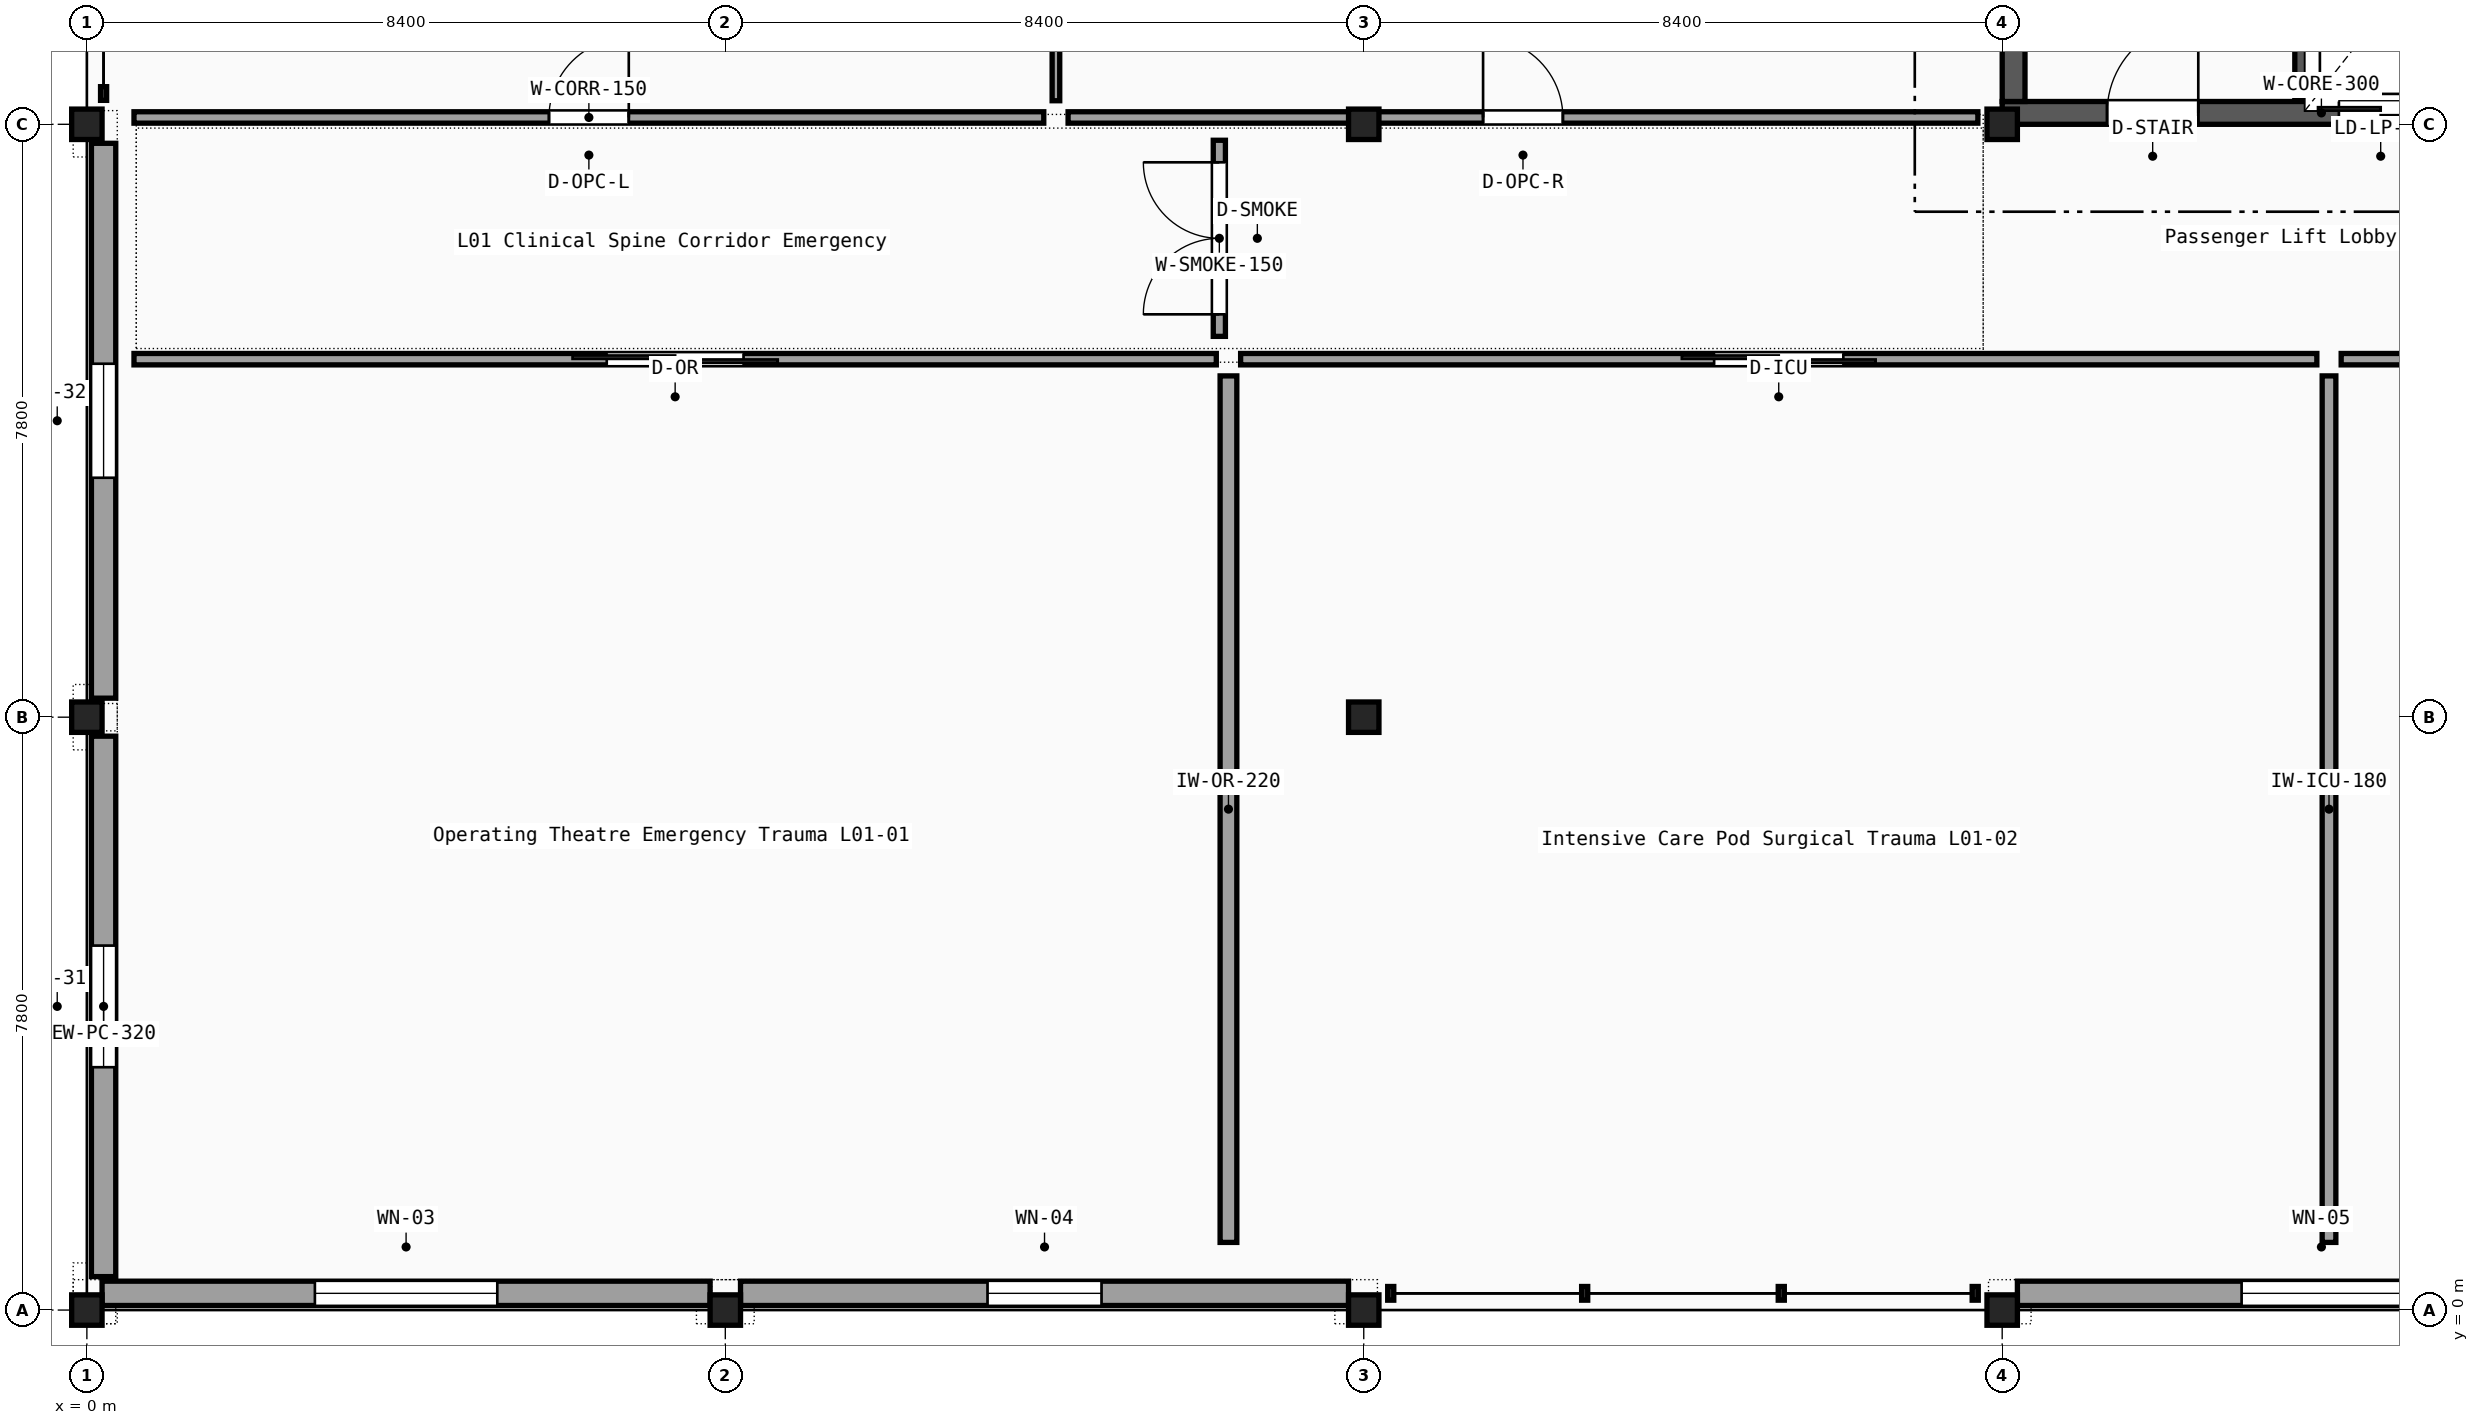
"""IFC4 building model, lengths in metres.
Left out: names, types, materials, properties, quantities, classifications, styles, units other than length and angle.
Written with IfcOpenShell. Run it as: python <this file> out.ifc"""

import sys

from ifc_helpers import new_model, si_unit, direction, frame, frame_2d, origin, origin_2d, place, context, subcontext, project, spatial, rectangle, i_section, extrude, element, fill, save


model = new_model("IFC4")
c1 = context("Model", 3, precision=1e-05, world=origin(), true_north=direction((0.0, 1.0)))
c2 = subcontext(c1, "Body", "Model", "MODEL_VIEW")
j1 = project(units=[si_unit("LENGTHUNIT", "METRE"), si_unit("PLANEANGLEUNIT", "RADIAN")], contexts=[c1])
p1 = place(None, origin())
s1 = spatial("IfcSite", under=j1, at=p1, CompositionType="ELEMENT")
p2 = place(p1, origin())
s2 = spatial("IfcBuilding", under=s1, at=p2, CompositionType="ELEMENT")
p3 = place(p2, frame((0.0, 0.0, 5.1)))
s3 = spatial("IfcBuildingStorey", under=s2, at=p3, CompositionType="ELEMENT", Elevation=5.1)
for number, where, z_axis, x_axis in (
    (1, (0.0, 0.0, 0.0), (0.0, 0.0, 1.0), (1.0, 0.0, 0.0)),
    (2, (0.0, 7.8, 0.0), (0.0, 0.0, 1.0), (1.0, 0.0, 0.0)),
    (3, (0.0, 15.6, 0.0), (0.0, 0.0, 1.0), (1.0, 0.0, 0.0)),
    (4, (8.4, 0.0, 0.0), (0.0, 0.0, 1.0), (1.0, 0.0, 0.0)),
    (5, (16.8, 0.0, 0.0), (0.0, 0.0, 1.0), (1.0, 0.0, 0.0)),
    (6, (16.8, 7.8, 0.0), (0.0, 0.0, 1.0), (1.0, 0.0, 0.0)),
    (7, (16.8, 15.6, 0.0), (0.0, 0.0, 1.0), (1.0, 0.0, 0.0)),
    (8, (25.2, 0.0, 0.0), (0.0, 0.0, 1.0), (1.0, 0.0, 0.0)),
    (9, (25.2, 15.6, 0.0), (0.0, 0.0, 1.0), (1.0, 0.0, 0.0)),
):
    element("IfcColumn", number, at=place(p3, frame(where, z_axis=z_axis, x_axis=x_axis)), inside=s3, PredefinedType="COLUMN", context=c2, shape_type="SweptSolid", body=[
        extrude(i_section(OverallWidth=0.3, OverallDepth=0.4, WebThickness=0.013, FlangeThickness=0.024, FilletRadius=0.027, at=origin_2d()), origin(), (0.0, 0.0, 1.0), 5.1),
    ])
p4 = place(p3, frame((0.22, 0.44, 0.0), z_axis=(0.0, 0.0, 1.0), x_axis=(0.0, 1.0, 0.0)))
e10 = element("IfcWall", 10, at=p4, inside=s3, PredefinedType="SOLIDWALL", context=c2, shape_type="SweptSolid", body=[
    extrude(rectangle(XDim=7.11, YDim=0.32, at=frame_2d((3.555, 0.0))), origin(), (0.0, 0.0, 1.0), 4.23),
])
p5 = place(p4, frame((2.755, 0.0, 0.95)))
e11 = element("IfcOpeningElement", 11, at=p5, cuts=e10, PredefinedType="OPENING", context=c2, shape_type="SweptSolid", body=[
    extrude(rectangle(XDim=1.6, YDim=1.55, at=frame_2d((0.8, 0.775))), frame((0.0, 0.17, 0.0), z_axis=(0.0, -1.0, 0.0), x_axis=(1.0, 0.0, 0.0)), (0.0, 0.0, 1.0), 0.34),
])
p6 = place(p3, frame((0.22, 8.05, 0.0), z_axis=(0.0, 0.0, 1.0), x_axis=(0.0, 1.0, 0.0)))
e12 = element("IfcWall", 12, at=p6, inside=s3, PredefinedType="SOLIDWALL", context=c2, shape_type="SweptSolid", body=[
    extrude(rectangle(XDim=7.3, YDim=0.32, at=frame_2d((3.65, 0.0))), origin(), (0.0, 0.0, 1.0), 4.23),
])
p7 = place(p6, frame((2.9, 0.0, 0.8)))
e13 = element("IfcOpeningElement", 13, at=p7, cuts=e12, PredefinedType="OPENING", context=c2, shape_type="SweptSolid", body=[
    extrude(rectangle(XDim=1.5, YDim=1.75, at=frame_2d((0.75, 0.875))), frame((0.0, 0.17, 0.0), z_axis=(0.0, -1.0, 0.0), x_axis=(1.0, 0.0, 0.0)), (0.0, 0.0, 1.0), 0.34),
])
p8 = place(p3, frame((0.2, 0.22, 0.0), z_axis=(0.0, 0.0, 1.0), x_axis=(1.0, 0.0, 0.0)))
e14 = element("IfcWall", 14, at=p8, inside=s3, PredefinedType="SOLIDWALL", context=c2, shape_type="SweptSolid", body=[
    extrude(rectangle(XDim=8.0, YDim=0.32, at=frame_2d((4.0, 0.0))), origin(), (0.0, 0.0, 1.0), 4.44),
])
p9 = place(p8, frame((2.8, 0.0, 0.9)))
e15 = element("IfcOpeningElement", 15, at=p9, cuts=e14, PredefinedType="OPENING", context=c2, shape_type="SweptSolid", body=[
    extrude(rectangle(XDim=2.4, YDim=1.6, at=frame_2d((1.2, 0.8))), frame((0.0, 0.17, 0.0), z_axis=(0.0, -1.0, 0.0), x_axis=(1.0, 0.0, 0.0)), (0.0, 0.0, 1.0), 0.34),
])
p10 = place(p3, frame((8.6, 0.22, 0.0), z_axis=(0.0, 0.0, 1.0), x_axis=(1.0, 0.0, 0.0)))
e16 = element("IfcWall", 16, at=p10, inside=s3, PredefinedType="SOLIDWALL", context=c2, shape_type="SweptSolid", body=[
    extrude(rectangle(XDim=8.0, YDim=0.32, at=frame_2d((4.0, 0.0))), origin(), (0.0, 0.0, 1.0), 4.43),
])
p11 = place(p10, frame((3.25, 0.0, 0.95)))
e17 = element("IfcOpeningElement", 17, at=p11, cuts=e16, PredefinedType="OPENING", context=c2, shape_type="SweptSolid", body=[
    extrude(rectangle(XDim=1.5, YDim=1.5, at=frame_2d((0.75, 0.75))), frame((0.0, 0.17, 0.0), z_axis=(0.0, -1.0, 0.0), x_axis=(1.0, 0.0, 0.0)), (0.0, 0.0, 1.0), 0.34),
])
p12 = place(p3, frame((25.4, 0.22, 0.0), z_axis=(0.0, 0.0, 1.0), x_axis=(1.0, 0.0, 0.0)))
e18 = element("IfcWall", 18, at=p12, inside=s3, PredefinedType="SOLIDWALL", context=c2, shape_type="SweptSolid", body=[
    extrude(rectangle(XDim=8.0, YDim=0.32, at=frame_2d((4.0, 0.0))), origin(), (0.0, 0.0, 1.0), 4.43),
])
p13 = place(p12, frame((2.95, 0.0, 0.95)))
e19 = element("IfcOpeningElement", 19, at=p13, cuts=e18, PredefinedType="OPENING", context=c2, shape_type="SweptSolid", body=[
    extrude(rectangle(XDim=2.1, YDim=1.5, at=frame_2d((1.05, 0.75))), frame((0.0, 0.17, 0.0), z_axis=(0.0, -1.0, 0.0), x_axis=(1.0, 0.0, 0.0)), (0.0, 0.0, 1.0), 0.34),
])
p14 = place(p3, frame((25.2, 15.75, 0.0), z_axis=(0.0, 0.0, 1.0), x_axis=(1.0, 0.0, 0.0)))
e20 = element("IfcWall", 20, at=p14, inside=s3, PredefinedType="SHEAR", context=c2, shape_type="SweptSolid", body=[
    extrude(rectangle(XDim=8.4, YDim=0.3, at=frame_2d((4.2, 0.0))), origin(), (0.0, 0.0, 1.0), 4.85),
])
p15 = place(p14, frame((1.38, 0.0, 0.0)))
e21 = element("IfcOpeningElement", 21, at=p15, cuts=e20, PredefinedType="OPENING", context=c2, shape_type="SweptSolid", body=[
    extrude(rectangle(XDim=1.2, YDim=2.15, at=frame_2d((0.6, 1.075))), frame((0.0, 0.16, 0.0), z_axis=(0.0, -1.0, 0.0), x_axis=(1.0, 0.0, 0.0)), (0.0, 0.0, 1.0), 0.32),
])
p16 = place(p14, frame((4.43, 0.0, 0.0)))
e22 = element("IfcOpeningElement", 22, at=p16, cuts=e20, PredefinedType="OPENING", context=c2, shape_type="SweptSolid", body=[
    extrude(rectangle(XDim=1.1, YDim=2.15, at=frame_2d((0.55, 1.075))), frame((0.0, 0.16, 0.0), z_axis=(0.0, -1.0, 0.0), x_axis=(1.0, 0.0, 0.0)), (0.0, 0.0, 1.0), 0.32),
])
p17 = place(p3, frame((25.35, 15.9, 0.0), z_axis=(0.0, 0.0, 1.0), x_axis=(0.0, 1.0, 0.0)))
e23 = element("IfcWall", 23, at=p17, inside=s3, PredefinedType="SHEAR", context=c2, shape_type="SweptSolid", body=[
    extrude(rectangle(XDim=7.2, YDim=0.3, at=frame_2d((3.6, 0.0))), origin(), (0.0, 0.0, 1.0), 4.85),
])
p18 = place(p3, frame((29.15, 15.92, 0.0), z_axis=(0.0, 0.0, 1.0), x_axis=(0.0, 1.0, 0.0)))
e24 = element("IfcWall", 24, at=p18, inside=s3, PredefinedType="SHEAR", context=c2, shape_type="SweptSolid", body=[
    extrude(rectangle(XDim=7.16, YDim=0.2, at=frame_2d((3.58, 0.0))), origin(), (0.0, 0.0, 1.0), 4.85),
])
p19 = place(p3, frame((0.62, 12.51, 0.0), z_axis=(0.0, 0.0, 1.0), x_axis=(1.0, 0.0, 0.0)))
e25 = element("IfcWall", 25, at=p19, inside=s3, PredefinedType="PARTITIONING", context=c2, shape_type="SweptSolid", body=[
    extrude(rectangle(XDim=14.24, YDim=0.15, at=frame_2d((7.12, 0.0))), origin(), (0.0, 0.0, 1.0), 4.82),
])
p20 = place(p19, frame((6.22, 0.0, 0.0)))
e26 = element("IfcOpeningElement", 26, at=p20, cuts=e25, PredefinedType="OPENING", context=c2, shape_type="SweptSolid", body=[
    extrude(rectangle(XDim=1.8, YDim=2.4, at=frame_2d((0.9, 1.2))), frame((0.0, 0.085, 0.0), z_axis=(0.0, -1.0, 0.0), x_axis=(1.0, 0.0, 0.0)), (0.0, 0.0, 1.0), 0.17),
])
p21 = place(p3, frame((15.02, 0.89, 0.0), z_axis=(0.0, 0.0, 1.0), x_axis=(0.0, 1.0, 0.0)))
e27 = element("IfcWall", 27, at=p21, inside=s3, PredefinedType="PARTITIONING", context=c2, shape_type="SweptSolid", body=[
    extrude(rectangle(XDim=11.4, YDim=0.22, at=frame_2d((5.7, 0.0))), origin(), (0.0, 0.0, 1.0), 4.23),
])
p22 = place(p3, frame((15.18, 12.51, 0.0), z_axis=(0.0, 0.0, 1.0), x_axis=(1.0, 0.0, 0.0)))
e28 = element("IfcWall", 28, at=p22, inside=s3, PredefinedType="PARTITIONING", context=c2, shape_type="SweptSolid", body=[
    extrude(rectangle(XDim=14.16, YDim=0.15, at=frame_2d((7.08, 0.0))), origin(), (0.0, 0.0, 1.0), 4.43),
])
p23 = place(p22, frame((6.23, 0.0, 0.0)))
e29 = element("IfcOpeningElement", 29, at=p23, cuts=e28, PredefinedType="OPENING", context=c2, shape_type="SweptSolid", body=[
    extrude(rectangle(XDim=1.7, YDim=2.3, at=frame_2d((0.85, 1.15))), frame((0.0, 0.085, 0.0), z_axis=(0.0, -1.0, 0.0), x_axis=(1.0, 0.0, 0.0)), (0.0, 0.0, 1.0), 0.17),
])
p24 = place(p3, frame((29.5, 0.89, 0.0), z_axis=(0.0, 0.0, 1.0), x_axis=(0.0, 1.0, 0.0)))
e30 = element("IfcWall", 30, at=p24, inside=s3, PredefinedType="PARTITIONING", context=c2, shape_type="SweptSolid", body=[
    extrude(rectangle(XDim=11.4, YDim=0.18, at=frame_2d((5.7, 0.0))), origin(), (0.0, 0.0, 1.0), 4.33),
])
p25 = place(p3, frame((29.66, 12.51, 0.0), z_axis=(0.0, 0.0, 1.0), x_axis=(1.0, 0.0, 0.0)))
e31 = element("IfcWall", 31, at=p25, inside=s3, PredefinedType="PARTITIONING", context=c2, shape_type="SweptSolid", body=[
    extrude(rectangle(XDim=14.16, YDim=0.15, at=frame_2d((7.08, 0.0))), origin(), (0.0, 0.0, 1.0), 4.43),
])
p26 = place(p25, frame((6.555, 0.0, 0.0)))
e32 = element("IfcOpeningElement", 32, at=p26, cuts=e31, PredefinedType="OPENING", context=c2, shape_type="SweptSolid", body=[
    extrude(rectangle(XDim=1.05, YDim=2.15, at=frame_2d((0.525, 1.075))), frame((0.0, 0.085, 0.0), z_axis=(0.0, -1.0, 0.0), x_axis=(1.0, 0.0, 0.0)), (0.0, 0.0, 1.0), 0.17),
])
p27 = place(p3, frame((0.62, 15.69, 0.0), z_axis=(0.0, 0.0, 1.0), x_axis=(1.0, 0.0, 0.0)))
e33 = element("IfcWall", 33, at=p27, inside=s3, PredefinedType="PARTITIONING", context=c2, shape_type="SweptSolid", body=[
    extrude(rectangle(XDim=11.97, YDim=0.15, at=frame_2d((5.985, 0.0))), origin(), (0.0, 0.0, 1.0), 4.33),
])
p28 = place(p27, frame((5.46, 0.0, 0.0)))
e34 = element("IfcOpeningElement", 34, at=p28, cuts=e33, PredefinedType="OPENING", context=c2, shape_type="SweptSolid", body=[
    extrude(rectangle(XDim=1.05, YDim=2.15, at=frame_2d((0.525, 1.075))), frame((0.0, 0.085, 0.0), z_axis=(0.0, -1.0, 0.0), x_axis=(1.0, 0.0, 0.0)), (0.0, 0.0, 1.0), 0.17),
])
p29 = place(p3, frame((12.75, 15.91, 0.0), z_axis=(0.0, 0.0, 1.0), x_axis=(0.0, 1.0, 0.0)))
e35 = element("IfcWall", 35, at=p29, inside=s3, PredefinedType="PARTITIONING", context=c2, shape_type="SweptSolid", body=[
    extrude(rectangle(XDim=22.4, YDim=0.1, at=frame_2d((11.2, 0.0))), origin(), (0.0, 0.0, 1.0), 4.33),
])
p30 = place(p3, frame((12.91, 15.69, 0.0), z_axis=(0.0, 0.0, 1.0), x_axis=(1.0, 0.0, 0.0)))
e36 = element("IfcWall", 36, at=p30, inside=s3, PredefinedType="PARTITIONING", context=c2, shape_type="SweptSolid", body=[
    extrude(rectangle(XDim=11.97, YDim=0.15, at=frame_2d((5.985, 0.0))), origin(), (0.0, 0.0, 1.0), 4.33),
])
p31 = place(p30, frame((5.46, 0.0, 0.0)))
e37 = element("IfcOpeningElement", 37, at=p31, cuts=e36, PredefinedType="OPENING", context=c2, shape_type="SweptSolid", body=[
    extrude(rectangle(XDim=1.05, YDim=2.15, at=frame_2d((0.525, 1.075))), frame((0.0, 0.085, 0.0), z_axis=(0.0, -1.0, 0.0), x_axis=(1.0, 0.0, 0.0)), (0.0, 0.0, 1.0), 0.17),
])
p32 = place(p3, frame((14.9, 12.81, 0.0), z_axis=(0.0, 0.0, 1.0), x_axis=(0.0, 1.0, 0.0)))
e38 = element("IfcWall", 38, at=p32, inside=s3, PredefinedType="PARTITIONING", context=c2, shape_type="SweptSolid", body=[
    extrude(rectangle(XDim=2.58, YDim=0.16, at=frame_2d((1.29, 0.0))), origin(), (0.0, 0.0, 1.0), 4.33),
])
p33 = place(p32, frame((0.29, 0.0, 0.0)))
e39 = element("IfcOpeningElement", 39, at=p33, cuts=e38, PredefinedType="OPENING", context=c2, shape_type="SweptSolid", body=[
    extrude(rectangle(XDim=2.0, YDim=2.3, at=frame_2d((1.0, 1.15))), frame((0.0, 0.09, 0.0), z_axis=(0.0, -1.0, 0.0), x_axis=(1.0, 0.0, 0.0)), (0.0, 0.0, 1.0), 0.18),
])
p34 = place(p5, origin())
e40 = element("IfcWindow", 40, at=p34, inside=s3, PartitioningType="SINGLE_PANEL", PredefinedType="WINDOW", context=c2, shape_type="SweptSolid", body=[
    extrude(rectangle(XDim=1.6, YDim=1.55, at=frame_2d((0.8, 0.775))), frame((0.0, 0.03, 0.0), z_axis=(0.0, -1.0, 0.0), x_axis=(1.0, 0.0, 0.0)), (0.0, 0.0, 1.0), 0.06),
])
fill(e11, e40)
p35 = place(p7, origin())
e41 = element("IfcWindow", 41, at=p35, inside=s3, PartitioningType="SINGLE_PANEL", PredefinedType="WINDOW", context=c2, shape_type="SweptSolid", body=[
    extrude(rectangle(XDim=1.5, YDim=1.75, at=frame_2d((0.75, 0.875))), frame((0.0, 0.03, 0.0), z_axis=(0.0, -1.0, 0.0), x_axis=(1.0, 0.0, 0.0)), (0.0, 0.0, 1.0), 0.06),
])
fill(e13, e41)
p36 = place(p9, origin())
e42 = element("IfcWindow", 42, at=p36, inside=s3, PartitioningType="SINGLE_PANEL", PredefinedType="WINDOW", context=c2, shape_type="SweptSolid", body=[
    extrude(rectangle(XDim=2.4, YDim=1.6, at=frame_2d((1.2, 0.8))), frame((0.0, 0.03, 0.0), z_axis=(0.0, -1.0, 0.0), x_axis=(1.0, 0.0, 0.0)), (0.0, 0.0, 1.0), 0.06),
])
fill(e15, e42)
p37 = place(p11, origin())
e43 = element("IfcWindow", 43, at=p37, inside=s3, PartitioningType="SINGLE_PANEL", PredefinedType="WINDOW", context=c2, shape_type="SweptSolid", body=[
    extrude(rectangle(XDim=1.5, YDim=1.5, at=frame_2d((0.75, 0.75))), frame((0.0, 0.03, 0.0), z_axis=(0.0, -1.0, 0.0), x_axis=(1.0, 0.0, 0.0)), (0.0, 0.0, 1.0), 0.06),
])
fill(e17, e43)
p38 = place(p13, origin())
e44 = element("IfcWindow", 44, at=p38, inside=s3, PartitioningType="SINGLE_PANEL", PredefinedType="WINDOW", context=c2, shape_type="SweptSolid", body=[
    extrude(rectangle(XDim=2.1, YDim=1.5, at=frame_2d((1.05, 0.75))), frame((0.0, 0.03, 0.0), z_axis=(0.0, -1.0, 0.0), x_axis=(1.0, 0.0, 0.0)), (0.0, 0.0, 1.0), 0.06),
])
fill(e19, e44)
p39 = place(p15, origin())
e45 = element("IfcDoor", 45, at=p39, inside=s3, OperationType="SINGLE_SWING_RIGHT", PredefinedType="DOOR", context=c2, shape_type="SweptSolid", body=[
    extrude(rectangle(XDim=1.2, YDim=2.15, at=frame_2d((0.6, 1.075))), frame((0.0, 0.025, 0.0), z_axis=(0.0, -1.0, 0.0), x_axis=(1.0, 0.0, 0.0)), (0.0, 0.0, 1.0), 0.05),
])
fill(e21, e45)
p40 = place(p16, origin())
e46 = element("IfcDoor", 46, at=p40, inside=s3, OperationType="DOUBLE_DOOR_SLIDING", PredefinedType="DOOR", context=c2, shape_type="SweptSolid", body=[
    extrude(rectangle(XDim=1.1, YDim=2.15, at=frame_2d((0.55, 1.075))), frame((0.0, 0.025, 0.0), z_axis=(0.0, -1.0, 0.0), x_axis=(1.0, 0.0, 0.0)), (0.0, 0.0, 1.0), 0.05),
])
fill(e22, e46)
p41 = place(p20, origin())
e47 = element("IfcDoor", 47, at=p41, inside=s3, OperationType="DOUBLE_DOOR_SLIDING", PredefinedType="DOOR", context=c2, shape_type="SweptSolid", body=[
    extrude(rectangle(XDim=1.8, YDim=2.4, at=frame_2d((0.9, 1.2))), frame((0.0, 0.025, 0.0), z_axis=(0.0, -1.0, 0.0), x_axis=(1.0, 0.0, 0.0)), (0.0, 0.0, 1.0), 0.05),
])
fill(e26, e47)
p42 = place(p23, origin())
e48 = element("IfcDoor", 48, at=p42, inside=s3, OperationType="DOUBLE_DOOR_SLIDING", PredefinedType="DOOR", context=c2, shape_type="SweptSolid", body=[
    extrude(rectangle(XDim=1.7, YDim=2.3, at=frame_2d((0.85, 1.15))), frame((0.0, 0.025, 0.0), z_axis=(0.0, -1.0, 0.0), x_axis=(1.0, 0.0, 0.0)), (0.0, 0.0, 1.0), 0.05),
])
fill(e29, e48)
p43 = place(p28, origin())
e49 = element("IfcDoor", 49, at=p43, inside=s3, OperationType="SINGLE_SWING_RIGHT", PredefinedType="DOOR", context=c2, shape_type="SweptSolid", body=[
    extrude(rectangle(XDim=1.05, YDim=2.15, at=frame_2d((0.525, 1.075))), frame((0.0, 0.025, 0.0), z_axis=(0.0, -1.0, 0.0), x_axis=(1.0, 0.0, 0.0)), (0.0, 0.0, 1.0), 0.05),
])
fill(e34, e49)
p44 = place(p31, origin())
e50 = element("IfcDoor", 50, at=p44, inside=s3, OperationType="SINGLE_SWING_LEFT", PredefinedType="DOOR", context=c2, shape_type="SweptSolid", body=[
    extrude(rectangle(XDim=1.05, YDim=2.15, at=frame_2d((0.525, 1.075))), frame((0.0, 0.025, 0.0), z_axis=(0.0, -1.0, 0.0), x_axis=(1.0, 0.0, 0.0)), (0.0, 0.0, 1.0), 0.05),
])
fill(e37, e50)
p45 = place(p33, origin())
e51 = element("IfcDoor", 51, at=p45, inside=s3, OperationType="DOUBLE_SWING_LEFT", PredefinedType="DOOR", context=c2, shape_type="SweptSolid", body=[
    extrude(rectangle(XDim=2.0, YDim=2.3, at=frame_2d((1.0, 1.15))), frame((0.0, 0.025, 0.0), z_axis=(0.0, -1.0, 0.0), x_axis=(1.0, 0.0, 0.0)), (0.0, 0.0, 1.0), 0.05),
])
fill(e39, e51)
save(model, sys.argv[1])
